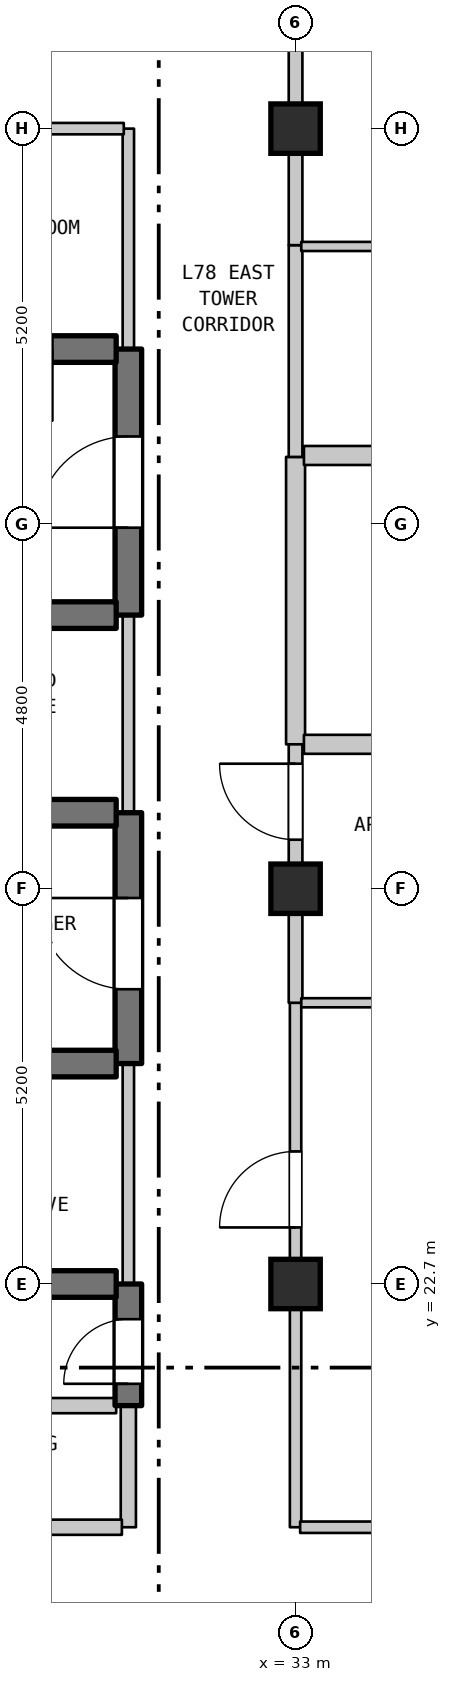
"""IFC4 building model, lengths in metres.
Left out: names, types, materials, properties, quantities, classifications, styles, units other than length and angle.
Written with IfcOpenShell. Run it as: python <this file> out.ifc"""

import sys

from ifc_helpers import new_model, si_unit, direction, frame, frame_2d, origin, origin_2d, place, context, subcontext, project, spatial, rectangle, extrude, element, fill, save


model = new_model("IFC4")
c1 = context("Model", 3, precision=1e-05, world=origin(), true_north=direction((0.0, 1.0)))
c2 = subcontext(c1, "Body", "Model", "MODEL_VIEW")
j1 = project(units=[si_unit("LENGTHUNIT", "METRE"), si_unit("PLANEANGLEUNIT", "RADIAN")], contexts=[c1])
p1 = place(None, origin())
s1 = spatial("IfcSite", under=j1, at=p1, CompositionType="ELEMENT")
p2 = place(p1, origin())
s2 = spatial("IfcBuilding", under=s1, at=p2, CompositionType="ELEMENT")
p3 = place(p2, frame((0.0, 0.0, 311.0)))
s3 = spatial("IfcBuildingStorey", under=s2, at=p3, CompositionType="ELEMENT", Elevation=311.0)
for number, where, z_axis, x_axis in (
    (1, (33.0, 22.7, 0.0), (0.0, 0.0, 1.0), (1.0, 0.0, 0.0)),
    (2, (33.0, 27.9, 0.0), (0.0, 0.0, 1.0), (1.0, 0.0, 0.0)),
    (3, (33.0, 37.9, 0.0), (0.0, 0.0, 1.0), (1.0, 0.0, 0.0)),
):
    element("IfcColumn", number, at=place(p3, frame(where, z_axis=z_axis, x_axis=x_axis)), inside=s3, PredefinedType="COLUMN", context=c2, shape_type="SweptSolid", body=[
        extrude(rectangle(XDim=0.65, YDim=0.65, at=origin_2d()), origin(), (0.0, 0.0, 1.0), 3.7),
    ])
p4 = place(p3, frame((30.8, 19.5, 0.0), z_axis=(0.0, 0.0, 1.0), x_axis=(0.0, 1.0, 0.0)))
e4 = element("IfcWall", 4, at=p4, inside=s3, PredefinedType="STANDARD", context=c2, shape_type="SweptSolid", body=[
    extrude(rectangle(XDim=1.6, YDim=0.2, at=frame_2d((0.8, 0.0))), origin(), (0.0, 0.0, 1.0), 3.28),
])
p5 = place(p3, frame((30.8, 21.1, 0.0), z_axis=(0.0, 0.0, 1.0), x_axis=(0.0, 1.0, 0.0)))
e5 = element("IfcWall", 5, at=p5, inside=s3, PredefinedType="SHEAR", context=c2, shape_type="SweptSolid", body=[
    extrude(rectangle(XDim=1.6, YDim=0.35, at=frame_2d((0.8, 0.0))), origin(), (0.0, 0.0, 1.0), 3.28),
])
p6 = place(p5, frame((0.287, 0.0, 0.0)))
e6 = element("IfcOpeningElement", 6, at=p6, cuts=e5, PredefinedType="OPENING", context=c2, shape_type="SweptSolid", body=[
    extrude(rectangle(XDim=0.85, YDim=2.1, at=frame_2d((0.425, 1.05))), frame((0.0, 0.185, 0.0), z_axis=(0.0, -1.0, 0.0), x_axis=(1.0, 0.0, 0.0)), (0.0, 0.0, 1.0), 0.37),
])
p7 = place(p3, frame((30.8, 22.7, 0.0), z_axis=(0.0, 0.0, 1.0), x_axis=(0.0, 1.0, 0.0)))
e7 = element("IfcWall", 7, at=p7, inside=s3, PredefinedType="STANDARD", context=c2, shape_type="SweptSolid", body=[
    extrude(rectangle(XDim=2.9, YDim=0.15, at=frame_2d((1.45, 0.0))), origin(), (0.0, 0.0, 1.0), 3.28),
])
p8 = place(p3, frame((30.8, 25.6, 0.0), z_axis=(0.0, 0.0, 1.0), x_axis=(0.0, 1.0, 0.0)))
e8 = element("IfcWall", 8, at=p8, inside=s3, PredefinedType="SHEAR", context=c2, shape_type="SweptSolid", body=[
    extrude(rectangle(XDim=3.3, YDim=0.35, at=frame_2d((1.65, 0.0))), origin(), (0.0, 0.0, 1.0), 3.28),
])
p9 = place(p8, frame((0.978, 0.0, 0.0)))
e9 = element("IfcOpeningElement", 9, at=p9, cuts=e8, PredefinedType="OPENING", context=c2, shape_type="SweptSolid", body=[
    extrude(rectangle(XDim=1.2, YDim=2.2, at=frame_2d((0.6, 1.1))), frame((0.0, 0.185, 0.0), z_axis=(0.0, -1.0, 0.0), x_axis=(1.0, 0.0, 0.0)), (0.0, 0.0, 1.0), 0.37),
])
p10 = place(p3, frame((30.8, 28.9, 0.0), z_axis=(0.0, 0.0, 1.0), x_axis=(0.0, 1.0, 0.0)))
e10 = element("IfcWall", 10, at=p10, inside=s3, PredefinedType="STANDARD", context=c2, shape_type="SweptSolid", body=[
    extrude(rectangle(XDim=2.6, YDim=0.15, at=frame_2d((1.3, 0.0))), origin(), (0.0, 0.0, 1.0), 3.28),
])
p11 = place(p3, frame((30.8, 31.5, 0.0), z_axis=(0.0, 0.0, 1.0), x_axis=(0.0, 1.0, 0.0)))
e11 = element("IfcWall", 11, at=p11, inside=s3, PredefinedType="SHEAR", context=c2, shape_type="SweptSolid", body=[
    extrude(rectangle(XDim=3.5, YDim=0.35, at=frame_2d((1.75, 0.0))), origin(), (0.0, 0.0, 1.0), 3.28),
])
p12 = place(p11, frame((1.15, 0.0, 0.0)))
e12 = element("IfcOpeningElement", 12, at=p12, cuts=e11, PredefinedType="OPENING", context=c2, shape_type="SweptSolid", body=[
    extrude(rectangle(XDim=1.2, YDim=2.2, at=frame_2d((0.6, 1.1))), frame((0.0, 0.185, 0.0), z_axis=(0.0, -1.0, 0.0), x_axis=(1.0, 0.0, 0.0)), (0.0, 0.0, 1.0), 0.37),
])
p13 = place(p3, frame((30.8, 35.0, 0.0), z_axis=(0.0, 0.0, 1.0), x_axis=(0.0, 1.0, 0.0)))
e13 = element("IfcWall", 13, at=p13, inside=s3, PredefinedType="STANDARD", context=c2, shape_type="SweptSolid", body=[
    extrude(rectangle(XDim=2.9, YDim=0.15, at=frame_2d((1.45, 0.0))), origin(), (0.0, 0.0, 1.0), 3.28),
])
p14 = place(p3, frame((33.0, 19.5, 0.0), z_axis=(0.0, 0.0, 1.0), x_axis=(0.0, 1.0, 0.0)))
e14 = element("IfcWall", 14, at=p14, inside=s3, PredefinedType="STANDARD", context=c2, shape_type="SweptSolid", body=[
    extrude(rectangle(XDim=6.9, YDim=0.15, at=frame_2d((3.45, 0.0))), origin(), (0.0, 0.0, 1.0), 2.99),
])
p15 = place(p14, frame((3.944, 0.0, 0.0)))
e15 = element("IfcOpeningElement", 15, at=p15, cuts=e14, PredefinedType="OPENING", context=c2, shape_type="SweptSolid", body=[
    extrude(rectangle(XDim=1.0, YDim=2.15, at=frame_2d((0.5, 1.075))), frame((0.0, 0.085, 0.0), z_axis=(0.0, -1.0, 0.0), x_axis=(1.0, 0.0, 0.0)), (0.0, 0.0, 1.0), 0.17),
])
p16 = place(p3, frame((33.0, 26.4, 0.0), z_axis=(0.0, 0.0, 1.0), x_axis=(0.0, 1.0, 0.0)))
e16 = element("IfcWall", 16, at=p16, inside=s3, PredefinedType="STANDARD", context=c2, shape_type="SweptSolid", body=[
    extrude(rectangle(XDim=1.5, YDim=0.18, at=frame_2d((0.75, 0.0))), origin(), (0.0, 0.0, 1.0), 2.99),
])
p17 = place(p3, frame((33.0, 29.8, 0.0), z_axis=(0.0, 0.0, 1.0), x_axis=(0.0, 1.0, 0.0)))
e17 = element("IfcWall", 17, at=p17, inside=s3, PredefinedType="STANDARD", context=c2, shape_type="SweptSolid", body=[
    extrude(rectangle(XDim=3.781, YDim=0.25, at=frame_2d((1.891, 0.0))), origin(), (0.0, 0.0, 1.0), 2.78),
])
p18 = place(p3, frame((33.0, 33.581, 0.0), z_axis=(0.0, 0.0, 1.0), x_axis=(0.0, 1.0, 0.0)))
e18 = element("IfcWall", 18, at=p18, inside=s3, PredefinedType="STANDARD", context=c2, shape_type="SweptSolid", body=[
    extrude(rectangle(XDim=2.786, YDim=0.18, at=frame_2d((1.393, 0.0))), origin(), (0.0, 0.0, 1.0), 2.78),
])
p19 = place(p3, frame((33.0, 36.367, 0.0), z_axis=(0.0, 0.0, 1.0), x_axis=(0.0, 1.0, 0.0)))
e19 = element("IfcWall", 19, at=p19, inside=s3, PredefinedType="STANDARD", context=c2, shape_type="SweptSolid", body=[
    extrude(rectangle(XDim=1.533, YDim=0.18, at=frame_2d((0.767, 0.0))), origin(), (0.0, 0.0, 1.0), 2.78),
])
p20 = place(p3, frame((27.285, 19.5, 0.0), z_axis=(0.0, 0.0, 1.0), x_axis=(1.0, 0.0, 0.0)))
e20 = element("IfcWall", 20, at=p20, inside=s3, PredefinedType="STANDARD", context=c2, shape_type="SweptSolid", body=[
    extrude(rectangle(XDim=3.43, YDim=0.2, at=frame_2d((1.715, 0.0))), origin(), (0.0, 0.0, 1.0), 3.28),
])
p21 = place(p20, frame((1.192, 0.0, 0.0)))
e21 = element("IfcOpeningElement", 21, at=p21, cuts=e20, PredefinedType="OPENING", context=c2, shape_type="SweptSolid", body=[
    extrude(rectangle(XDim=0.9, YDim=2.15, at=frame_2d((0.45, 1.075))), frame((0.0, 0.11, 0.0), z_axis=(0.0, -1.0, 0.0), x_axis=(1.0, 0.0, 0.0)), (0.0, 0.0, 1.0), 0.22),
])
p22 = place(p3, frame((33.06, 19.5, 0.0), z_axis=(0.0, 0.0, 1.0), x_axis=(1.0, 0.0, 0.0)))
e22 = element("IfcWall", 22, at=p22, inside=s3, PredefinedType="STANDARD", context=c2, shape_type="SweptSolid", body=[
    extrude(rectangle(XDim=8.323, YDim=0.15, at=frame_2d((4.162, 0.0))), origin(), (0.0, 0.0, 1.0), 3.28),
])
p23 = place(p22, frame((3.583, 0.0, 0.0)))
e23 = element("IfcOpeningElement", 23, at=p23, cuts=e22, PredefinedType="OPENING", context=c2, shape_type="SweptSolid", body=[
    extrude(rectangle(XDim=1.0, YDim=2.15, at=frame_2d((0.5, 1.075))), frame((0.0, 0.085, 0.0), z_axis=(0.0, -1.0, 0.0), x_axis=(1.0, 0.0, 0.0)), (0.0, 0.0, 1.0), 0.17),
])
p24 = place(p3, frame((27.285, 21.1, 0.0), z_axis=(0.0, 0.0, 1.0), x_axis=(1.0, 0.0, 0.0)))
e24 = element("IfcWall", 24, at=p24, inside=s3, PredefinedType="STANDARD", context=c2, shape_type="SweptSolid", body=[
    extrude(rectangle(XDim=3.355, YDim=0.2, at=frame_2d((1.677, 0.0))), origin(), (0.0, 0.0, 1.0), 3.28),
])
p25 = place(p3, frame((27.46, 22.7, 0.0), z_axis=(0.0, 0.0, 1.0), x_axis=(1.0, 0.0, 0.0)))
e25 = element("IfcWall", 25, at=p25, inside=s3, PredefinedType="SHEAR", context=c2, shape_type="SweptSolid", body=[
    extrude(rectangle(XDim=3.18, YDim=0.35, at=frame_2d((1.59, 0.0))), origin(), (0.0, 0.0, 1.0), 3.28),
])
p26 = place(p3, frame((27.46, 25.6, 0.0), z_axis=(0.0, 0.0, 1.0), x_axis=(1.0, 0.0, 0.0)))
e26 = element("IfcWall", 26, at=p26, inside=s3, PredefinedType="SHEAR", context=c2, shape_type="SweptSolid", body=[
    extrude(rectangle(XDim=3.18, YDim=0.35, at=frame_2d((1.59, 0.0))), origin(), (0.0, 0.0, 1.0), 3.28),
])
p27 = place(p26, frame((1.115, 0.0, 0.0)))
e27 = element("IfcOpeningElement", 27, at=p27, cuts=e26, PredefinedType="OPENING", context=c2, shape_type="SweptSolid", body=[
    extrude(rectangle(XDim=0.95, YDim=2.15, at=frame_2d((0.475, 1.075))), frame((0.0, 0.185, 0.0), z_axis=(0.0, -1.0, 0.0), x_axis=(1.0, 0.0, 0.0)), (0.0, 0.0, 1.0), 0.37),
])
p28 = place(p3, frame((33.075, 26.4, 0.0), z_axis=(0.0, 0.0, 1.0), x_axis=(1.0, 0.0, 0.0)))
e28 = element("IfcWall", 28, at=p28, inside=s3, PredefinedType="PARTITIONING", context=c2, shape_type="SweptSolid", body=[
    extrude(rectangle(XDim=11.703, YDim=0.12, at=frame_2d((5.852, 0.0))), origin(), (0.0, 0.0, 1.0), 3.28),
])
p29 = place(p3, frame((27.46, 28.9, 0.0), z_axis=(0.0, 0.0, 1.0), x_axis=(1.0, 0.0, 0.0)))
e29 = element("IfcWall", 29, at=p29, inside=s3, PredefinedType="SHEAR", context=c2, shape_type="SweptSolid", body=[
    extrude(rectangle(XDim=3.18, YDim=0.35, at=frame_2d((1.59, 0.0))), origin(), (0.0, 0.0, 1.0), 3.28),
])
p30 = place(p29, frame((1.115, 0.0, 0.0)))
e30 = element("IfcOpeningElement", 30, at=p30, cuts=e29, PredefinedType="OPENING", context=c2, shape_type="SweptSolid", body=[
    extrude(rectangle(XDim=0.95, YDim=2.15, at=frame_2d((0.475, 1.075))), frame((0.0, 0.185, 0.0), z_axis=(0.0, -1.0, 0.0), x_axis=(1.0, 0.0, 0.0)), (0.0, 0.0, 1.0), 0.37),
])
p31 = place(p3, frame((33.11, 29.8, 0.0), z_axis=(0.0, 0.0, 1.0), x_axis=(1.0, 0.0, 0.0)))
e31 = element("IfcWall", 31, at=p31, inside=s3, PredefinedType="STANDARD", context=c2, shape_type="SweptSolid", body=[
    extrude(rectangle(XDim=4.36, YDim=0.25, at=frame_2d((2.18, 0.0))), origin(), (0.0, 0.0, 1.0), 3.28),
])
p32 = place(p3, frame((27.46, 31.5, 0.0), z_axis=(0.0, 0.0, 1.0), x_axis=(1.0, 0.0, 0.0)))
e32 = element("IfcWall", 32, at=p32, inside=s3, PredefinedType="SHEAR", context=c2, shape_type="SweptSolid", body=[
    extrude(rectangle(XDim=3.18, YDim=0.35, at=frame_2d((1.59, 0.0))), origin(), (0.0, 0.0, 1.0), 3.28),
])
p33 = place(p3, frame((33.11, 33.6, 0.0), z_axis=(0.0, 0.0, 1.0), x_axis=(1.0, 0.0, 0.0)))
e33 = element("IfcWall", 33, at=p33, inside=s3, PredefinedType="STANDARD", context=c2, shape_type="SweptSolid", body=[
    extrude(rectangle(XDim=4.36, YDim=0.25, at=frame_2d((2.18, 0.0))), origin(), (0.0, 0.0, 1.0), 3.28),
])
p34 = place(p3, frame((28.045, 35.0, 0.0), z_axis=(0.0, 0.0, 1.0), x_axis=(1.0, 0.0, 0.0)))
e34 = element("IfcWall", 34, at=p34, inside=s3, PredefinedType="SHEAR", context=c2, shape_type="SweptSolid", body=[
    extrude(rectangle(XDim=2.595, YDim=0.35, at=frame_2d((1.297, 0.0))), origin(), (0.0, 0.0, 1.0), 3.28),
])
p35 = place(p34, frame((0.806, 0.0, 0.0)))
e35 = element("IfcOpeningElement", 35, at=p35, cuts=e34, PredefinedType="OPENING", context=c2, shape_type="SweptSolid", body=[
    extrude(rectangle(XDim=0.95, YDim=2.15, at=frame_2d((0.475, 1.075))), frame((0.0, 0.185, 0.0), z_axis=(0.0, -1.0, 0.0), x_axis=(1.0, 0.0, 0.0)), (0.0, 0.0, 1.0), 0.37),
])
p36 = place(p3, frame((33.075, 36.35, 0.0), z_axis=(0.0, 0.0, 1.0), x_axis=(1.0, 0.0, 0.0)))
e36 = element("IfcWall", 36, at=p36, inside=s3, PredefinedType="PARTITIONING", context=c2, shape_type="SweptSolid", body=[
    extrude(rectangle(XDim=4.46, YDim=0.12, at=frame_2d((2.23, 0.0))), origin(), (0.0, 0.0, 1.0), 3.28),
])
p37 = place(p3, frame((28.045, 37.9, 0.0), z_axis=(0.0, 0.0, 1.0), x_axis=(1.0, 0.0, 0.0)))
e37 = element("IfcWall", 37, at=p37, inside=s3, PredefinedType="STANDARD", context=c2, shape_type="SweptSolid", body=[
    extrude(rectangle(XDim=2.695, YDim=0.15, at=frame_2d((1.348, 0.0))), origin(), (0.0, 0.0, 1.0), 2.78),
])
p38 = place(p3, frame((33.0, 27.9, 0.0), z_axis=(0.0, 0.0, 1.0), x_axis=(0.0, 1.0, 0.0)))
e38 = element("IfcWall", 38, at=p38, inside=s3, PredefinedType="STANDARD", context=c2, shape_type="SweptSolid", body=[
    extrude(rectangle(XDim=1.9, YDim=0.18, at=frame_2d((0.95, 0.0))), origin(), (0.0, 0.0, 1.0), 2.78),
])
p39 = place(p38, frame((0.645, 0.0, 0.0)))
e39 = element("IfcOpeningElement", 39, at=p39, cuts=e38, PredefinedType="OPENING", context=c2, shape_type="SweptSolid", body=[
    extrude(rectangle(XDim=1.0, YDim=2.15, at=frame_2d((0.5, 1.075))), frame((0.0, 0.1, 0.0), z_axis=(0.0, -1.0, 0.0), x_axis=(1.0, 0.0, 0.0)), (0.0, 0.0, 1.0), 0.2),
])
p40 = place(p3, frame((33.0, 37.9, 0.0), z_axis=(0.0, 0.0, 1.0), x_axis=(0.0, 1.0, 0.0)))
e40 = element("IfcWall", 40, at=p40, inside=s3, PredefinedType="STANDARD", context=c2, shape_type="SweptSolid", body=[
    extrude(rectangle(XDim=1.85, YDim=0.18, at=frame_2d((0.925, 0.0))), origin(), (0.0, 0.0, 1.0), 2.68),
])
p41 = place(p6, origin())
e41 = element("IfcDoor", 41, at=p41, inside=s3, OperationType="SINGLE_SWING_LEFT", PredefinedType="DOOR", context=c2, shape_type="SweptSolid", body=[
    extrude(rectangle(XDim=0.85, YDim=2.1, at=frame_2d((0.425, 1.05))), frame((0.0, 0.025, 0.0), z_axis=(0.0, -1.0, 0.0), x_axis=(1.0, 0.0, 0.0)), (0.0, 0.0, 1.0), 0.05),
])
fill(e6, e41)
p42 = place(p9, origin())
e42 = element("IfcDoor", 42, at=p42, inside=s3, OperationType="SINGLE_SWING_RIGHT", PredefinedType="DOOR", context=c2, shape_type="SweptSolid", body=[
    extrude(rectangle(XDim=1.2, YDim=2.2, at=frame_2d((0.6, 1.1))), frame((0.0, 0.025, 0.0), z_axis=(0.0, -1.0, 0.0), x_axis=(1.0, 0.0, 0.0)), (0.0, 0.0, 1.0), 0.05),
])
fill(e9, e42)
p43 = place(p12, origin())
e43 = element("IfcDoor", 43, at=p43, inside=s3, OperationType="SINGLE_SWING_LEFT", PredefinedType="DOOR", context=c2, shape_type="SweptSolid", body=[
    extrude(rectangle(XDim=1.2, YDim=2.2, at=frame_2d((0.6, 1.1))), frame((0.0, 0.025, 0.0), z_axis=(0.0, -1.0, 0.0), x_axis=(1.0, 0.0, 0.0)), (0.0, 0.0, 1.0), 0.05),
])
fill(e12, e43)
p44 = place(p15, origin())
e44 = element("IfcDoor", 44, at=p44, inside=s3, OperationType="SINGLE_SWING_LEFT", PredefinedType="DOOR", context=c2, shape_type="SweptSolid", body=[
    extrude(rectangle(XDim=1.0, YDim=2.15, at=frame_2d((0.5, 1.075))), frame((0.0, 0.025, 0.0), z_axis=(0.0, -1.0, 0.0), x_axis=(1.0, 0.0, 0.0)), (0.0, 0.0, 1.0), 0.05),
])
fill(e15, e44)
p45 = place(p39, origin())
e45 = element("IfcDoor", 45, at=p45, inside=s3, OperationType="SINGLE_SWING_RIGHT", PredefinedType="DOOR", context=c2, shape_type="SweptSolid", body=[
    extrude(rectangle(XDim=1.0, YDim=2.15, at=frame_2d((0.5, 1.075))), frame((0.0, 0.025, 0.0), z_axis=(0.0, -1.0, 0.0), x_axis=(1.0, 0.0, 0.0)), (0.0, 0.0, 1.0), 0.05),
])
fill(e39, e45)
p46 = place(p35, frame((0.95, 0.0, 0.0), z_axis=(0.0, 0.0, 1.0), x_axis=(-1.0, 0.0, 0.0)))
e46 = element("IfcDoor", 46, at=p46, inside=s3, OperationType="SINGLE_SWING_RIGHT", PredefinedType="DOOR", context=c2, shape_type="SweptSolid", body=[
    extrude(rectangle(XDim=0.95, YDim=2.15, at=frame_2d((0.475, 1.075))), frame((0.0, 0.025, 0.0), z_axis=(0.0, -1.0, 0.0), x_axis=(1.0, 0.0, 0.0)), (0.0, 0.0, 1.0), 0.05),
])
fill(e35, e46)
save(model, sys.argv[1])
